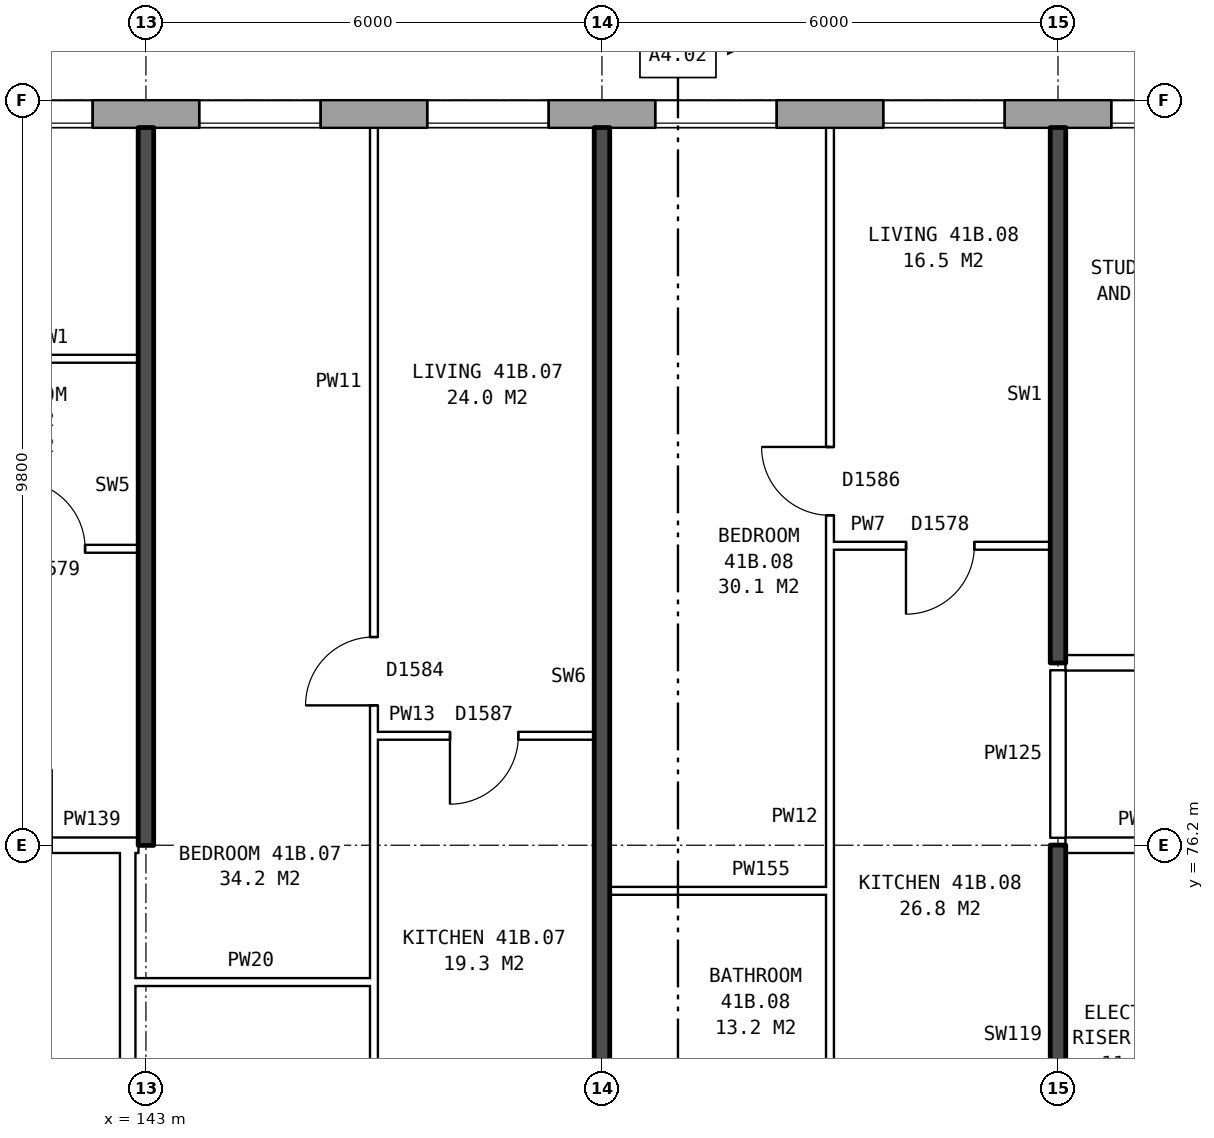
"""IFC4 building model, lengths in metres.
Left out: names, types, materials, properties, quantities, classifications, styles, units other than length and angle.
Written with IfcOpenShell. Run it as: python <this file> out.ifc"""

import sys

from ifc_helpers import new_model, si_unit, direction, frame, frame_2d, origin, place, context, subcontext, project, spatial, rectangle, extrude, element, fill, save


model = new_model("IFC4")
c1 = context("Model", 3, precision=1e-05, world=origin(), true_north=direction((0.0, 1.0)))
c2 = subcontext(c1, "Body", "Model", "MODEL_VIEW")
j1 = project(units=[si_unit("LENGTHUNIT", "METRE"), si_unit("PLANEANGLEUNIT", "RADIAN")], contexts=[c1])
p1 = place(None, origin())
s1 = spatial("IfcSite", under=j1, at=p1, CompositionType="ELEMENT")
p2 = place(p1, origin())
s2 = spatial("IfcBuilding", under=s1, at=p2, CompositionType="ELEMENT")
p3 = place(p2, frame((0.0, 0.0, 148.5)))
s3 = spatial("IfcBuildingStorey", under=s2, at=p3, CompositionType="ELEMENT", Elevation=148.5)
p4 = place(p3, frame((168.425, 85.82, 0.0), z_axis=(0.0, 0.0, 1.0), x_axis=(-1.0, 0.0, 0.0)))
e1 = element("IfcWall", 1, at=p4, inside=s3, PredefinedType="STANDARD", context=c2, shape_type="SweptSolid", body=[
    extrude(rectangle(XDim=34.351, YDim=0.36, at=frame_2d((17.175, 0.0))), origin(), (0.0, 0.0, 1.0), 2.85),
])
p5 = place(p4, frame((2.125, 0.0, 0.8)))
e2 = element("IfcOpeningElement", 2, at=p5, cuts=e1, PredefinedType="OPENING", context=c2, shape_type="SweptSolid", body=[
    extrude(rectangle(XDim=1.6, YDim=1.8, at=frame_2d((0.8, 0.9))), frame((0.0, 0.19, 0.0), z_axis=(0.0, -1.0, 0.0), x_axis=(1.0, 0.0, 0.0)), (0.0, 0.0, 1.0), 0.38),
])
p6 = place(p4, frame((5.125, 0.0, 0.8)))
e3 = element("IfcOpeningElement", 3, at=p6, cuts=e1, PredefinedType="OPENING", context=c2, shape_type="SweptSolid", body=[
    extrude(rectangle(XDim=1.6, YDim=1.8, at=frame_2d((0.8, 0.9))), frame((0.0, 0.19, 0.0), z_axis=(0.0, -1.0, 0.0), x_axis=(1.0, 0.0, 0.0)), (0.0, 0.0, 1.0), 0.38),
])
p7 = place(p4, frame((8.125, 0.0, 0.8)))
e4 = element("IfcOpeningElement", 4, at=p7, cuts=e1, PredefinedType="OPENING", context=c2, shape_type="SweptSolid", body=[
    extrude(rectangle(XDim=1.6, YDim=1.8, at=frame_2d((0.8, 0.9))), frame((0.0, 0.19, 0.0), z_axis=(0.0, -1.0, 0.0), x_axis=(1.0, 0.0, 0.0)), (0.0, 0.0, 1.0), 0.38),
])
p8 = place(p4, frame((11.125, 0.0, 0.8)))
e5 = element("IfcOpeningElement", 5, at=p8, cuts=e1, PredefinedType="OPENING", context=c2, shape_type="SweptSolid", body=[
    extrude(rectangle(XDim=1.6, YDim=1.8, at=frame_2d((0.8, 0.9))), frame((0.0, 0.19, 0.0), z_axis=(0.0, -1.0, 0.0), x_axis=(1.0, 0.0, 0.0)), (0.0, 0.0, 1.0), 0.38),
])
p9 = place(p4, frame((14.125, 0.0, 0.8)))
e6 = element("IfcOpeningElement", 6, at=p9, cuts=e1, PredefinedType="OPENING", context=c2, shape_type="SweptSolid", body=[
    extrude(rectangle(XDim=1.6, YDim=1.8, at=frame_2d((0.8, 0.9))), frame((0.0, 0.19, 0.0), z_axis=(0.0, -1.0, 0.0), x_axis=(1.0, 0.0, 0.0)), (0.0, 0.0, 1.0), 0.38),
])
p10 = place(p4, frame((17.125, 0.0, 0.8)))
e7 = element("IfcOpeningElement", 7, at=p10, cuts=e1, PredefinedType="OPENING", context=c2, shape_type="SweptSolid", body=[
    extrude(rectangle(XDim=1.6, YDim=1.8, at=frame_2d((0.8, 0.9))), frame((0.0, 0.19, 0.0), z_axis=(0.0, -1.0, 0.0), x_axis=(1.0, 0.0, 0.0)), (0.0, 0.0, 1.0), 0.38),
])
p11 = place(p4, frame((20.125, 0.0, 0.8)))
e8 = element("IfcOpeningElement", 8, at=p11, cuts=e1, PredefinedType="OPENING", context=c2, shape_type="SweptSolid", body=[
    extrude(rectangle(XDim=1.6, YDim=1.8, at=frame_2d((0.8, 0.9))), frame((0.0, 0.19, 0.0), z_axis=(0.0, -1.0, 0.0), x_axis=(1.0, 0.0, 0.0)), (0.0, 0.0, 1.0), 0.38),
])
p12 = place(p4, frame((23.125, 0.0, 0.8)))
e9 = element("IfcOpeningElement", 9, at=p12, cuts=e1, PredefinedType="OPENING", context=c2, shape_type="SweptSolid", body=[
    extrude(rectangle(XDim=1.6, YDim=1.8, at=frame_2d((0.8, 0.9))), frame((0.0, 0.19, 0.0), z_axis=(0.0, -1.0, 0.0), x_axis=(1.0, 0.0, 0.0)), (0.0, 0.0, 1.0), 0.38),
])
p13 = place(p4, frame((26.125, 0.0, 0.8)))
e10 = element("IfcOpeningElement", 10, at=p13, cuts=e1, PredefinedType="OPENING", context=c2, shape_type="SweptSolid", body=[
    extrude(rectangle(XDim=1.6, YDim=1.8, at=frame_2d((0.8, 0.9))), frame((0.0, 0.19, 0.0), z_axis=(0.0, -1.0, 0.0), x_axis=(1.0, 0.0, 0.0)), (0.0, 0.0, 1.0), 0.38),
])
p14 = place(p4, frame((29.125, 0.0, 0.8)))
e11 = element("IfcOpeningElement", 11, at=p14, cuts=e1, PredefinedType="OPENING", context=c2, shape_type="SweptSolid", body=[
    extrude(rectangle(XDim=1.6, YDim=1.8, at=frame_2d((0.8, 0.9))), frame((0.0, 0.19, 0.0), z_axis=(0.0, -1.0, 0.0), x_axis=(1.0, 0.0, 0.0)), (0.0, 0.0, 1.0), 0.38),
])
p15 = place(p4, frame((32.125, 0.0, 0.8)))
e12 = element("IfcOpeningElement", 12, at=p15, cuts=e1, PredefinedType="OPENING", context=c2, shape_type="SweptSolid", body=[
    extrude(rectangle(XDim=1.6, YDim=1.8, at=frame_2d((0.8, 0.9))), frame((0.0, 0.19, 0.0), z_axis=(0.0, -1.0, 0.0), x_axis=(1.0, 0.0, 0.0)), (0.0, 0.0, 1.0), 0.38),
])
p16 = place(p3, frame((142.76, 63.9, 0.0), z_axis=(0.0, 0.0, 1.0), x_axis=(0.0, 1.0, 0.0)))
e13 = element("IfcWall", 13, at=p16, inside=s3, PredefinedType="PARTITIONING", context=c2, shape_type="SweptSolid", body=[
    extrude(rectangle(XDim=12.2, YDim=0.2, at=frame_2d((6.1, 0.0))), origin(), (0.0, 0.0, 1.0), 2.85),
])
p17 = place(p16, frame((5.1, 0.0, 0.0)))
e14 = element("IfcOpeningElement", 14, at=p17, cuts=e13, PredefinedType="OPENING", context=c2, shape_type="SweptSolid", body=[
    extrude(rectangle(XDim=2.0, YDim=2.1, at=frame_2d((1.0, 1.05))), frame((0.0, 0.11, 0.0), z_axis=(0.0, -1.0, 0.0), x_axis=(1.0, 0.0, 0.0)), (0.0, 0.0, 1.0), 0.22),
])
p18 = place(p3, frame((142.76, 74.4, 0.0), z_axis=(0.0, 0.0, 1.0), x_axis=(1.0, 0.0, 0.0)))
e15 = element("IfcWall", 15, at=p18, inside=s3, PredefinedType="PARTITIONING", context=c2, shape_type="SweptSolid", body=[
    extrude(rectangle(XDim=3.24, YDim=0.1, at=frame_2d((1.62, 0.0))), origin(), (0.0, 0.0, 1.0), 2.85),
])
p19 = place(p3, frame((149.1, 75.6, 0.0), z_axis=(0.0, 0.0, 1.0), x_axis=(1.0, 0.0, 0.0)))
e16 = element("IfcWall", 16, at=p19, inside=s3, PredefinedType="PARTITIONING", context=c2, shape_type="SweptSolid", body=[
    extrude(rectangle(XDim=2.9, YDim=0.1, at=frame_2d((1.45, 0.0))), origin(), (0.0, 0.0, 1.0), 2.85),
])
p20 = place(p3, frame((139.76, 76.2, 0.0), z_axis=(0.0, 0.0, 1.0), x_axis=(1.0, 0.0, 0.0)))
e17 = element("IfcWall", 17, at=p20, inside=s3, PredefinedType="PARTITIONING", context=c2, shape_type="SweptSolid", body=[
    extrude(rectangle(XDim=3.0, YDim=0.2, at=frame_2d((1.5, 0.0))), origin(), (0.0, 0.0, 1.0), 2.85),
])
p21 = place(p20, frame((1.0, 0.0, 0.0)))
e18 = element("IfcOpeningElement", 18, at=p21, cuts=e17, PredefinedType="OPENING", context=c2, shape_type="SweptSolid", body=[
    extrude(rectangle(XDim=1.0, YDim=2.1, at=frame_2d((0.5, 1.05))), frame((0.0, 0.11, 0.0), z_axis=(0.0, -1.0, 0.0), x_axis=(1.0, 0.0, 0.0)), (0.0, 0.0, 1.0), 0.22),
])
p22 = place(p3, frame((142.76, 76.2, 0.0), z_axis=(0.0, 0.0, 1.0), x_axis=(1.0, 0.0, 0.0)))
e19 = element("IfcWall", 19, at=p22, inside=s3, PredefinedType="PARTITIONING", context=c2, shape_type="SweptSolid", body=[
    extrude(rectangle(XDim=0.14, YDim=0.2, at=frame_2d((0.07, 0.0))), origin(), (0.0, 0.0, 1.0), 2.85),
])
p23 = place(p3, frame((155.1, 76.2, 0.0), z_axis=(0.0, 0.0, 1.0), x_axis=(1.0, 0.0, 0.0)))
e20 = element("IfcWall", 20, at=p23, inside=s3, PredefinedType="PARTITIONING", context=c2, shape_type="SweptSolid", body=[
    extrude(rectangle(XDim=2.14, YDim=0.2, at=frame_2d((1.07, 0.0))), origin(), (0.0, 0.0, 1.0), 2.85),
])
p24 = place(p3, frame((146.0, 77.64, 0.0), z_axis=(0.0, 0.0, 1.0), x_axis=(1.0, 0.0, 0.0)))
e21 = element("IfcWall", 21, at=p24, inside=s3, PredefinedType="PARTITIONING", context=c2, shape_type="SweptSolid", body=[
    extrude(rectangle(XDim=2.9, YDim=0.1, at=frame_2d((1.45, 0.0))), origin(), (0.0, 0.0, 1.0), 2.85),
])
p25 = place(p24, frame((1.0, 0.0, 0.0)))
e22 = element("IfcOpeningElement", 22, at=p25, cuts=e21, PredefinedType="OPENING", context=c2, shape_type="SweptSolid", body=[
    extrude(rectangle(XDim=0.9, YDim=2.1, at=frame_2d((0.45, 1.05))), frame((0.0, 0.06, 0.0), z_axis=(0.0, -1.0, 0.0), x_axis=(1.0, 0.0, 0.0)), (0.0, 0.0, 1.0), 0.12),
])
p26 = place(p3, frame((155.1, 78.6, 0.0), z_axis=(0.0, 0.0, 1.0), x_axis=(1.0, 0.0, 0.0)))
e23 = element("IfcWall", 23, at=p26, inside=s3, PredefinedType="PARTITIONING", context=c2, shape_type="SweptSolid", body=[
    extrude(rectangle(XDim=16.04, YDim=0.2, at=frame_2d((8.02, 0.0))), origin(), (0.0, 0.0, 1.0), 2.85),
])
p27 = place(p26, frame((1.45, 0.0, 0.0)))
e24 = element("IfcOpeningElement", 24, at=p27, cuts=e23, PredefinedType="OPENING", context=c2, shape_type="SweptSolid", body=[
    extrude(rectangle(XDim=1.0, YDim=2.1, at=frame_2d((0.5, 1.05))), frame((0.0, 0.11, 0.0), z_axis=(0.0, -1.0, 0.0), x_axis=(1.0, 0.0, 0.0)), (0.0, 0.0, 1.0), 0.22),
])
p28 = place(p26, frame((8.4, 0.0, 0.0)))
e25 = element("IfcOpeningElement", 25, at=p28, cuts=e23, PredefinedType="OPENING", context=c2, shape_type="SweptSolid", body=[
    extrude(rectangle(XDim=1.0, YDim=2.1, at=frame_2d((0.5, 1.05))), frame((0.0, 0.11, 0.0), z_axis=(0.0, -1.0, 0.0), x_axis=(1.0, 0.0, 0.0)), (0.0, 0.0, 1.0), 0.22),
])
p29 = place(p3, frame((137.1, 80.1, 0.0), z_axis=(0.0, 0.0, 1.0), x_axis=(1.0, 0.0, 0.0)))
e26 = element("IfcWall", 26, at=p29, inside=s3, PredefinedType="PARTITIONING", context=c2, shape_type="SweptSolid", body=[
    extrude(rectangle(XDim=5.8, YDim=0.1, at=frame_2d((2.9, 0.0))), origin(), (0.0, 0.0, 1.0), 2.85),
])
p30 = place(p29, frame((1.3, 0.0, 0.0)))
e27 = element("IfcOpeningElement", 27, at=p30, cuts=e26, PredefinedType="OPENING", context=c2, shape_type="SweptSolid", body=[
    extrude(rectangle(XDim=0.9, YDim=2.1, at=frame_2d((0.45, 1.05))), frame((0.0, 0.06, 0.0), z_axis=(0.0, -1.0, 0.0), x_axis=(1.0, 0.0, 0.0)), (0.0, 0.0, 1.0), 0.12),
])
p31 = place(p29, frame((4.2, 0.0, 0.0)))
e28 = element("IfcOpeningElement", 28, at=p31, cuts=e26, PredefinedType="OPENING", context=c2, shape_type="SweptSolid", body=[
    extrude(rectangle(XDim=0.9, YDim=2.1, at=frame_2d((0.45, 1.05))), frame((0.0, 0.06, 0.0), z_axis=(0.0, -1.0, 0.0), x_axis=(1.0, 0.0, 0.0)), (0.0, 0.0, 1.0), 0.12),
])
p32 = place(p3, frame((152.0, 80.14, 0.0), z_axis=(0.0, 0.0, 1.0), x_axis=(1.0, 0.0, 0.0)))
e29 = element("IfcWall", 29, at=p32, inside=s3, PredefinedType="PARTITIONING", context=c2, shape_type="SweptSolid", body=[
    extrude(rectangle(XDim=2.9, YDim=0.1, at=frame_2d((1.45, 0.0))), origin(), (0.0, 0.0, 1.0), 2.85),
])
p33 = place(p32, frame((1.0, 0.0, 0.0)))
e30 = element("IfcOpeningElement", 30, at=p33, cuts=e29, PredefinedType="OPENING", context=c2, shape_type="SweptSolid", body=[
    extrude(rectangle(XDim=0.9, YDim=2.1, at=frame_2d((0.45, 1.05))), frame((0.0, 0.06, 0.0), z_axis=(0.0, -1.0, 0.0), x_axis=(1.0, 0.0, 0.0)), (0.0, 0.0, 1.0), 0.12),
])
p34 = place(p3, frame((140.6, 82.6, 0.0), z_axis=(0.0, 0.0, 1.0), x_axis=(1.0, 0.0, 0.0)))
e31 = element("IfcWall", 31, at=p34, inside=s3, PredefinedType="PARTITIONING", context=c2, shape_type="SweptSolid", body=[
    extrude(rectangle(XDim=2.3, YDim=0.1, at=frame_2d((1.15, 0.0))), origin(), (0.0, 0.0, 1.0), 2.85),
])
p35 = place(p3, frame((143.0, 76.2, 0.0), z_axis=(0.0, 0.0, 1.0), x_axis=(0.0, 1.0, 0.0)))
e32 = element("IfcWall", 32, at=p35, inside=s3, PredefinedType="SOLIDWALL", context=c2, shape_type="SweptSolid", body=[
    extrude(rectangle(XDim=9.44, YDim=0.2, at=frame_2d((4.72, 0.0))), origin(), (0.0, 0.0, 1.0), 2.85),
])
p36 = place(p3, frame((146.0, 71.3, 0.0), z_axis=(0.0, 0.0, 1.0), x_axis=(0.0, 1.0, 0.0)))
e33 = element("IfcWall", 33, at=p36, inside=s3, PredefinedType="PARTITIONING", context=c2, shape_type="SweptSolid", body=[
    extrude(rectangle(XDim=14.34, YDim=0.1, at=frame_2d((7.17, 0.0))), origin(), (0.0, 0.0, 1.0), 2.85),
])
p37 = place(p36, frame((6.74, 0.0, 0.0)))
e34 = element("IfcOpeningElement", 34, at=p37, cuts=e33, PredefinedType="OPENING", context=c2, shape_type="SweptSolid", body=[
    extrude(rectangle(XDim=0.9, YDim=2.1, at=frame_2d((0.45, 1.05))), frame((0.0, 0.06, 0.0), z_axis=(0.0, -1.0, 0.0), x_axis=(1.0, 0.0, 0.0)), (0.0, 0.0, 1.0), 0.12),
])
p38 = place(p36, frame((0.4, 0.0, 0.0)))
e35 = element("IfcOpeningElement", 35, at=p38, cuts=e33, PredefinedType="OPENING", context=c2, shape_type="SweptSolid", body=[
    extrude(rectangle(XDim=0.9, YDim=2.1, at=frame_2d((0.45, 1.05))), frame((0.0, 0.06, 0.0), z_axis=(0.0, -1.0, 0.0), x_axis=(1.0, 0.0, 0.0)), (0.0, 0.0, 1.0), 0.12),
])
p39 = place(p3, frame((149.0, 71.2, 0.0), z_axis=(0.0, 0.0, 1.0), x_axis=(0.0, 1.0, 0.0)))
e36 = element("IfcWall", 36, at=p39, inside=s3, PredefinedType="SOLIDWALL", context=c2, shape_type="SweptSolid", body=[
    extrude(rectangle(XDim=14.44, YDim=0.2, at=frame_2d((7.22, 0.0))), origin(), (0.0, 0.0, 1.0), 2.85),
])
p40 = place(p3, frame((152.0, 71.3, 0.0), z_axis=(0.0, 0.0, 1.0), x_axis=(0.0, 1.0, 0.0)))
e37 = element("IfcWall", 37, at=p40, inside=s3, PredefinedType="PARTITIONING", context=c2, shape_type="SweptSolid", body=[
    extrude(rectangle(XDim=14.34, YDim=0.1, at=frame_2d((7.17, 0.0))), origin(), (0.0, 0.0, 1.0), 2.85),
])
p41 = place(p40, frame((9.24, 0.0, 0.0)))
e38 = element("IfcOpeningElement", 38, at=p41, cuts=e37, PredefinedType="OPENING", context=c2, shape_type="SweptSolid", body=[
    extrude(rectangle(XDim=0.9, YDim=2.1, at=frame_2d((0.45, 1.05))), frame((0.0, 0.06, 0.0), z_axis=(0.0, -1.0, 0.0), x_axis=(1.0, 0.0, 0.0)), (0.0, 0.0, 1.0), 0.12),
])
p42 = place(p40, frame((0.4, 0.0, 0.0)))
e39 = element("IfcOpeningElement", 39, at=p42, cuts=e37, PredefinedType="OPENING", context=c2, shape_type="SweptSolid", body=[
    extrude(rectangle(XDim=0.9, YDim=2.1, at=frame_2d((0.45, 1.05))), frame((0.0, 0.06, 0.0), z_axis=(0.0, -1.0, 0.0), x_axis=(1.0, 0.0, 0.0)), (0.0, 0.0, 1.0), 0.12),
])
p43 = place(p3, frame((155.0, 71.2, 0.0), z_axis=(0.0, 0.0, 1.0), x_axis=(0.0, 1.0, 0.0)))
e40 = element("IfcWall", 40, at=p43, inside=s3, PredefinedType="SOLIDWALL", context=c2, shape_type="SweptSolid", body=[
    extrude(rectangle(XDim=5.0, YDim=0.2, at=frame_2d((2.5, 0.0))), origin(), (0.0, 0.0, 1.0), 2.85),
])
p44 = place(p3, frame((155.0, 76.3, 0.0), z_axis=(0.0, 0.0, 1.0), x_axis=(0.0, 1.0, 0.0)))
e41 = element("IfcWall", 41, at=p44, inside=s3, PredefinedType="PARTITIONING", context=c2, shape_type="SweptSolid", body=[
    extrude(rectangle(XDim=2.2, YDim=0.2, at=frame_2d((1.1, 0.0))), origin(), (0.0, 0.0, 1.0), 2.85),
])
p45 = place(p3, frame((155.0, 78.6, 0.0), z_axis=(0.0, 0.0, 1.0), x_axis=(0.0, 1.0, 0.0)))
e42 = element("IfcWall", 42, at=p45, inside=s3, PredefinedType="SOLIDWALL", context=c2, shape_type="SweptSolid", body=[
    extrude(rectangle(XDim=7.04, YDim=0.2, at=frame_2d((3.52, 0.0))), origin(), (0.0, 0.0, 1.0), 2.85),
])
p46 = place(p8, origin())
e43 = element("IfcWindow", 43, at=p46, inside=s3, PartitioningType="SINGLE_PANEL", PredefinedType="WINDOW", context=c2, shape_type="SweptSolid", body=[
    extrude(rectangle(XDim=1.6, YDim=1.8, at=frame_2d((0.8, 0.9))), frame((0.0, 0.15, 0.0), z_axis=(0.0, -1.0, 0.0), x_axis=(1.0, 0.0, 0.0)), (0.0, 0.0, 1.0), 0.06),
])
fill(e5, e43)
p47 = place(p9, origin())
e44 = element("IfcWindow", 44, at=p47, inside=s3, PartitioningType="SINGLE_PANEL", PredefinedType="WINDOW", context=c2, shape_type="SweptSolid", body=[
    extrude(rectangle(XDim=1.6, YDim=1.8, at=frame_2d((0.8, 0.9))), frame((0.0, 0.15, 0.0), z_axis=(0.0, -1.0, 0.0), x_axis=(1.0, 0.0, 0.0)), (0.0, 0.0, 1.0), 0.06),
])
fill(e6, e44)
p48 = place(p10, origin())
e45 = element("IfcWindow", 45, at=p48, inside=s3, PartitioningType="SINGLE_PANEL", PredefinedType="WINDOW", context=c2, shape_type="SweptSolid", body=[
    extrude(rectangle(XDim=1.6, YDim=1.8, at=frame_2d((0.8, 0.9))), frame((0.0, 0.15, 0.0), z_axis=(0.0, -1.0, 0.0), x_axis=(1.0, 0.0, 0.0)), (0.0, 0.0, 1.0), 0.06),
])
fill(e7, e45)
p49 = place(p11, origin())
e46 = element("IfcWindow", 46, at=p49, inside=s3, PartitioningType="SINGLE_PANEL", PredefinedType="WINDOW", context=c2, shape_type="SweptSolid", body=[
    extrude(rectangle(XDim=1.6, YDim=1.8, at=frame_2d((0.8, 0.9))), frame((0.0, 0.15, 0.0), z_axis=(0.0, -1.0, 0.0), x_axis=(1.0, 0.0, 0.0)), (0.0, 0.0, 1.0), 0.06),
])
fill(e8, e46)
p50 = place(p12, origin())
e47 = element("IfcWindow", 47, at=p50, inside=s3, PartitioningType="SINGLE_PANEL", PredefinedType="WINDOW", context=c2, shape_type="SweptSolid", body=[
    extrude(rectangle(XDim=1.6, YDim=1.8, at=frame_2d((0.8, 0.9))), frame((0.0, 0.15, 0.0), z_axis=(0.0, -1.0, 0.0), x_axis=(1.0, 0.0, 0.0)), (0.0, 0.0, 1.0), 0.06),
])
fill(e9, e47)
p51 = place(p13, origin())
e48 = element("IfcWindow", 48, at=p51, inside=s3, PartitioningType="SINGLE_PANEL", PredefinedType="WINDOW", context=c2, shape_type="SweptSolid", body=[
    extrude(rectangle(XDim=1.6, YDim=1.8, at=frame_2d((0.8, 0.9))), frame((0.0, 0.15, 0.0), z_axis=(0.0, -1.0, 0.0), x_axis=(1.0, 0.0, 0.0)), (0.0, 0.0, 1.0), 0.06),
])
fill(e10, e48)
p52 = place(p31, origin())
e49 = element("IfcDoor", 49, at=p52, inside=s3, OperationType="SINGLE_SWING_LEFT", PredefinedType="DOOR", context=c2, shape_type="SweptSolid", body=[
    extrude(rectangle(XDim=0.9, YDim=2.1, at=frame_2d((0.45, 1.05))), frame((0.0, 0.025, 0.0), z_axis=(0.0, -1.0, 0.0), x_axis=(1.0, 0.0, 0.0)), (0.0, 0.0, 1.0), 0.05),
])
fill(e28, e49)
p53 = place(p37, origin())
e50 = element("IfcDoor", 50, at=p53, inside=s3, OperationType="SINGLE_SWING_LEFT", PredefinedType="DOOR", context=c2, shape_type="SweptSolid", body=[
    extrude(rectangle(XDim=0.9, YDim=2.1, at=frame_2d((0.45, 1.05))), frame((0.0, 0.025, 0.0), z_axis=(0.0, -1.0, 0.0), x_axis=(1.0, 0.0, 0.0)), (0.0, 0.0, 1.0), 0.05),
])
fill(e34, e50)
p54 = place(p25, frame((0.9, 0.0, 0.0), z_axis=(0.0, 0.0, 1.0), x_axis=(-1.0, 0.0, 0.0)))
e51 = element("IfcDoor", 51, at=p54, inside=s3, OperationType="SINGLE_SWING_RIGHT", PredefinedType="DOOR", context=c2, shape_type="SweptSolid", body=[
    extrude(rectangle(XDim=0.9, YDim=2.1, at=frame_2d((0.45, 1.05))), frame((0.0, 0.025, 0.0), z_axis=(0.0, -1.0, 0.0), x_axis=(1.0, 0.0, 0.0)), (0.0, 0.0, 1.0), 0.05),
])
fill(e22, e51)
p55 = place(p41, origin())
e52 = element("IfcDoor", 52, at=p55, inside=s3, OperationType="SINGLE_SWING_RIGHT", PredefinedType="DOOR", context=c2, shape_type="SweptSolid", body=[
    extrude(rectangle(XDim=0.9, YDim=2.1, at=frame_2d((0.45, 1.05))), frame((0.0, 0.025, 0.0), z_axis=(0.0, -1.0, 0.0), x_axis=(1.0, 0.0, 0.0)), (0.0, 0.0, 1.0), 0.05),
])
fill(e38, e52)
p56 = place(p33, frame((0.9, 0.0, 0.0), z_axis=(0.0, 0.0, 1.0), x_axis=(-1.0, 0.0, 0.0)))
e53 = element("IfcDoor", 53, at=p56, inside=s3, OperationType="SINGLE_SWING_RIGHT", PredefinedType="DOOR", context=c2, shape_type="SweptSolid", body=[
    extrude(rectangle(XDim=0.9, YDim=2.1, at=frame_2d((0.45, 1.05))), frame((0.0, 0.025, 0.0), z_axis=(0.0, -1.0, 0.0), x_axis=(1.0, 0.0, 0.0)), (0.0, 0.0, 1.0), 0.05),
])
fill(e30, e53)
save(model, sys.argv[1])
